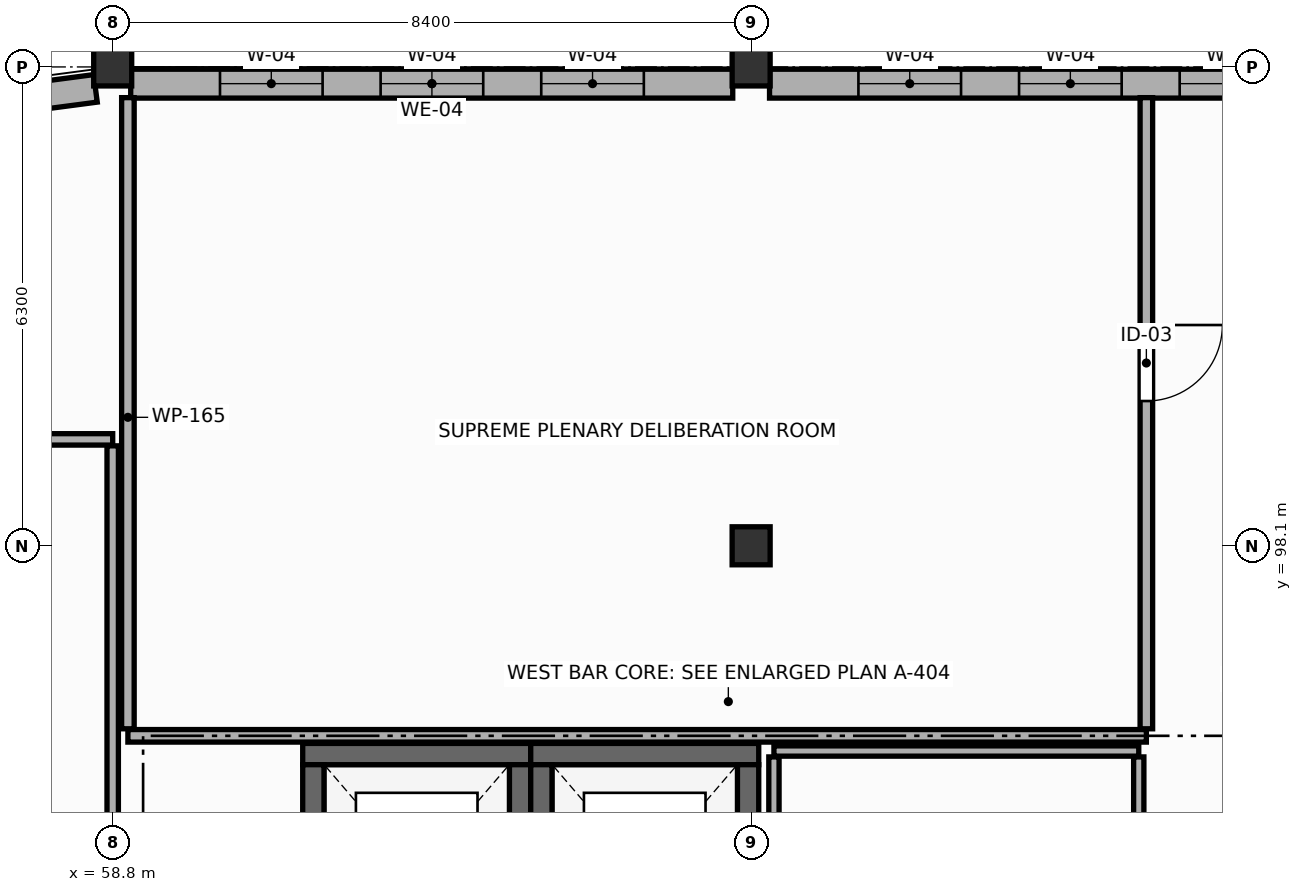
"""IFC4 building model, lengths in metres.
Left out: names, types, materials, properties, quantities, classifications, styles, units other than length and angle.
Written with IfcOpenShell. Run it as: python <this file> out.ifc"""

import sys

from ifc_helpers import new_model, si_unit, direction, frame, frame_2d, origin, origin_2d, place, context, subcontext, project, spatial, rectangle, extrude, element, fill, save


model = new_model("IFC4")
c1 = context("Model", 3, precision=1e-05, world=origin(), true_north=direction((0.0, 1.0)))
c2 = subcontext(c1, "Body", "Model", "MODEL_VIEW")
j1 = project(units=[si_unit("LENGTHUNIT", "METRE"), si_unit("PLANEANGLEUNIT", "RADIAN")], contexts=[c1])
p1 = place(None, origin())
s1 = spatial("IfcSite", under=j1, at=p1, CompositionType="ELEMENT")
p2 = place(p1, origin())
s2 = spatial("IfcBuilding", under=s1, at=p2, CompositionType="ELEMENT")
p3 = place(p2, frame((0.0, 0.0, 35.4)))
s3 = spatial("IfcBuildingStorey", under=s2, at=p3, CompositionType="ELEMENT", Elevation=35.4)
for number, where, z_axis, x_axis in (
    (1, (58.8, 104.4, 0.0), (0.0, 0.0, 1.0), (1.0, 0.0, 0.0)),
    (2, (67.2, 104.4, 0.0), (0.0, 0.0, 1.0), (1.0, 0.0, 0.0)),
    (3, (67.2, 98.1, 0.0), (0.0, 0.0, 1.0), (1.0, 0.0, 0.0)),
):
    element("IfcColumn", number, at=place(p3, frame(where, z_axis=z_axis, x_axis=x_axis)), inside=s3, PredefinedType="COLUMN", context=c2, shape_type="SweptSolid", body=[
        extrude(rectangle(XDim=0.5, YDim=0.5, at=origin_2d()), origin(), (0.0, 0.0, 1.0), 4.2),
    ])
p4 = place(p3, frame((59.037, 104.18, 0.0), z_axis=(0.0, 0.0, 1.0), x_axis=(1.0, 0.0, 0.0)))
e4 = element("IfcWall", 4, at=p4, inside=s3, PredefinedType="STANDARD", context=c2, shape_type="SweptSolid", body=[
    extrude(rectangle(XDim=7.921, YDim=0.38, at=frame_2d((3.96, 0.0))), origin(), (0.0, 0.0, 1.0), 3.095),
])
p5 = place(p4, frame((1.175, 0.0, 0.85)))
e5 = element("IfcOpeningElement", 5, at=p5, cuts=e4, PredefinedType="OPENING", context=c2, shape_type="SweptSolid", body=[
    extrude(rectangle(XDim=1.35, YDim=1.95, at=frame_2d((0.675, 0.975))), frame((0.0, 0.2, 0.0), z_axis=(0.0, -1.0, 0.0), x_axis=(1.0, 0.0, 0.0)), (0.0, 0.0, 1.0), 0.4),
])
p6 = place(p4, frame((3.288, 0.0, 0.85)))
e6 = element("IfcOpeningElement", 6, at=p6, cuts=e4, PredefinedType="OPENING", context=c2, shape_type="SweptSolid", body=[
    extrude(rectangle(XDim=1.35, YDim=1.95, at=frame_2d((0.675, 0.975))), frame((0.0, 0.2, 0.0), z_axis=(0.0, -1.0, 0.0), x_axis=(1.0, 0.0, 0.0)), (0.0, 0.0, 1.0), 0.4),
])
p7 = place(p4, frame((5.401, 0.0, 0.85)))
e7 = element("IfcOpeningElement", 7, at=p7, cuts=e4, PredefinedType="OPENING", context=c2, shape_type="SweptSolid", body=[
    extrude(rectangle(XDim=1.35, YDim=1.95, at=frame_2d((0.675, 0.975))), frame((0.0, 0.2, 0.0), z_axis=(0.0, -1.0, 0.0), x_axis=(1.0, 0.0, 0.0)), (0.0, 0.0, 1.0), 0.4),
])
p8 = place(p3, frame((67.442, 104.18, 0.0), z_axis=(0.0, 0.0, 1.0), x_axis=(1.0, 0.0, 0.0)))
e8 = element("IfcWall", 8, at=p8, inside=s3, PredefinedType="STANDARD", context=c2, shape_type="SweptSolid", body=[
    extrude(rectangle(XDim=7.916, YDim=0.38, at=frame_2d((3.958, 0.0))), origin(), (0.0, 0.0, 1.0), 3.095),
])
p9 = place(p8, frame((1.17, 0.0, 0.85)))
e9 = element("IfcOpeningElement", 9, at=p9, cuts=e8, PredefinedType="OPENING", context=c2, shape_type="SweptSolid", body=[
    extrude(rectangle(XDim=1.35, YDim=1.95, at=frame_2d((0.675, 0.975))), frame((0.0, 0.2, 0.0), z_axis=(0.0, -1.0, 0.0), x_axis=(1.0, 0.0, 0.0)), (0.0, 0.0, 1.0), 0.4),
])
p10 = place(p8, frame((3.283, 0.0, 0.85)))
e10 = element("IfcOpeningElement", 10, at=p10, cuts=e8, PredefinedType="OPENING", context=c2, shape_type="SweptSolid", body=[
    extrude(rectangle(XDim=1.35, YDim=1.95, at=frame_2d((0.675, 0.975))), frame((0.0, 0.2, 0.0), z_axis=(0.0, -1.0, 0.0), x_axis=(1.0, 0.0, 0.0)), (0.0, 0.0, 1.0), 0.4),
])
p11 = place(p8, frame((5.396, 0.0, 0.85)))
e11 = element("IfcOpeningElement", 11, at=p11, cuts=e8, PredefinedType="OPENING", context=c2, shape_type="SweptSolid", body=[
    extrude(rectangle(XDim=1.35, YDim=1.95, at=frame_2d((0.675, 0.975))), frame((0.0, 0.2, 0.0), z_axis=(0.0, -1.0, 0.0), x_axis=(1.0, 0.0, 0.0)), (0.0, 0.0, 1.0), 0.4),
])
p12 = place(p3, frame((58.573, 104.118, 0.0), z_axis=(0.0, 0.0, 1.0), x_axis=(-0.991449079029, -0.130494151946, 0.0)))
e12 = element("IfcWall", 12, at=p12, inside=s3, PredefinedType="ELEMENTEDWALL", context=c2, shape_type="SweptSolid", body=[
    extrude(rectangle(XDim=3.027, YDim=0.365, at=frame_2d((1.514, 0.0))), origin(), (0.0, 0.0, 1.0), 3.095),
])
p13 = place(p12, frame((1.128, 0.0, 0.85)))
e13 = element("IfcOpeningElement", 13, at=p13, cuts=e12, PredefinedType="OPENING", context=c2, shape_type="SweptSolid", body=[
    extrude(rectangle(XDim=0.8, YDim=1.7, at=frame_2d((0.4, 0.85))), frame((0.0, 0.192, 0.0), z_axis=(0.0, -1.0, 0.0), x_axis=(1.0, 0.0, 0.0)), (0.0, 0.0, 1.0), 0.385),
])
p14 = place(p3, frame((58.8, 104.25, 4.2), z_axis=(0.0, 0.0, 1.0), x_axis=(1.0, 0.0, 0.0)))
e14 = element("IfcWall", 14, at=p14, inside=s3, PredefinedType="PARAPET", context=c2, shape_type="SweptSolid", body=[
    extrude(rectangle(XDim=43.2, YDim=0.245, at=frame_2d((21.6, 0.0))), origin(), (0.0, 0.0, 1.0), 1.15),
])
p15 = place(p3, frame((58.8, 79.7, 4.2), z_axis=(0.0, 0.0, 1.0), x_axis=(0.0, 1.0, 0.0)))
e15 = element("IfcWall", 15, at=p15, inside=s3, PredefinedType="PARAPET", context=c2, shape_type="SweptSolid", body=[
    extrude(rectangle(XDim=24.2, YDim=0.245, at=frame_2d((12.1, 0.0))), origin(), (0.0, 0.0, 1.0), 1.15),
])
p16 = place(p3, frame((61.3, 95.36, 0.0), z_axis=(0.0, 0.0, 1.0), x_axis=(1.0, 0.0, 0.0)))
e16 = element("IfcWall", 16, at=p16, inside=s3, PredefinedType="SHEAR", context=c2, shape_type="SweptSolid", body=[
    extrude(rectangle(XDim=3.0, YDim=0.28, at=frame_2d((1.5, 0.0))), origin(), (0.0, 0.0, 1.0), 3.98),
])
for number, where, z_axis, x_axis in (
    (17, (61.44, 92.38, 0.0), (0.0, 0.0, 1.0), (0.0, 1.0, 0.0)),
    (18, (64.16, 95.22, 0.0), (0.0, 0.0, 1.0), (0.0, -1.0, 0.0)),
):
    element("IfcWall", number, at=place(p3, frame(where, z_axis=z_axis, x_axis=x_axis)), inside=s3, PredefinedType="SHEAR", context=c2, shape_type="SweptSolid", body=[
        extrude(rectangle(XDim=2.84, YDim=0.28, at=frame_2d((1.42, 0.0))), origin(), (0.0, 0.0, 1.0), 3.98),
    ])
p17 = place(p3, frame((64.3, 95.36, 0.0), z_axis=(0.0, 0.0, 1.0), x_axis=(1.0, 0.0, 0.0)))
e19 = element("IfcWall", 19, at=p17, inside=s3, PredefinedType="SHEAR", context=c2, shape_type="SweptSolid", body=[
    extrude(rectangle(XDim=3.0, YDim=0.28, at=frame_2d((1.5, 0.0))), origin(), (0.0, 0.0, 1.0), 3.98),
])
for number, where, z_axis, x_axis in (
    (20, (64.44, 92.38, 0.0), (0.0, 0.0, 1.0), (0.0, 1.0, 0.0)),
    (21, (67.16, 95.22, 0.0), (0.0, 0.0, 1.0), (0.0, -1.0, 0.0)),
):
    element("IfcWall", number, at=place(p3, frame(where, z_axis=z_axis, x_axis=x_axis)), inside=s3, PredefinedType="SHEAR", context=c2, shape_type="SweptSolid", body=[
        extrude(rectangle(XDim=2.84, YDim=0.28, at=frame_2d((1.42, 0.0))), origin(), (0.0, 0.0, 1.0), 3.98),
    ])
p18 = place(p3, frame((72.4, 95.6, 0.0), z_axis=(0.0, 0.0, 1.0), x_axis=(-1.0, 0.0, 0.0)))
e22 = element("IfcWall", 22, at=p18, inside=s3, PredefinedType="PARTITIONING", context=c2, shape_type="SweptSolid", body=[
    extrude(rectangle(XDim=13.4, YDim=0.165, at=frame_2d((6.7, 0.0))), origin(), (0.0, 0.0, 1.0), 3.095),
])
p19 = place(p3, frame((59.0, 95.692, 0.0), z_axis=(0.0, 0.0, 1.0), x_axis=(0.0, 1.0, 0.0)))
e23 = element("IfcWall", 23, at=p19, inside=s3, PredefinedType="PARTITIONING", context=c2, shape_type="SweptSolid", body=[
    extrude(rectangle(XDim=8.304, YDim=0.165, at=frame_2d((4.152, 0.0))), origin(), (0.0, 0.0, 1.0), 3.095),
])
p20 = place(p3, frame((72.4, 103.996, 0.0), z_axis=(0.0, 0.0, 1.0), x_axis=(0.0, -1.0, 0.0)))
e24 = element("IfcWall", 24, at=p20, inside=s3, PredefinedType="PARTITIONING", context=c2, shape_type="SweptSolid", body=[
    extrude(rectangle(XDim=8.304, YDim=0.165, at=frame_2d((4.152, 0.0))), origin(), (0.0, 0.0, 1.0), 3.95),
])
p21 = place(p20, frame((2.991, 0.0, 0.0)))
e25 = element("IfcOpeningElement", 25, at=p21, cuts=e24, PredefinedType="OPENING", context=c2, shape_type="SweptSolid", body=[
    extrude(rectangle(XDim=1.0, YDim=2.15, at=frame_2d((0.5, 1.075))), frame((0.0, 0.093, 0.0), z_axis=(0.0, -1.0, 0.0), x_axis=(1.0, 0.0, 0.0)), (0.0, 0.0, 1.0), 0.185),
])
p22 = place(p3, frame((67.5, 95.4, 0.0), z_axis=(0.0, 0.0, 1.0), x_axis=(1.0, 0.0, 0.0)))
e26 = element("IfcWall", 26, at=p22, inside=s3, PredefinedType="PARTITIONING", context=c2, shape_type="SweptSolid", body=[
    extrude(rectangle(XDim=4.8, YDim=0.135, at=frame_2d((2.4, 0.0))), origin(), (0.0, 0.0, 1.0), 3.495),
])
for number, where, z_axis, x_axis in (
    (27, (67.5, 92.028, 0.0), (0.0, 0.0, 1.0), (0.0, 1.0, 0.0)),
    (28, (72.3, 95.323, 0.0), (0.0, 0.0, 1.0), (0.0, -1.0, 0.0)),
):
    element("IfcWall", number, at=place(p3, frame(where, z_axis=z_axis, x_axis=x_axis)), inside=s3, PredefinedType="PARTITIONING", context=c2, shape_type="SweptSolid", body=[
        extrude(rectangle(XDim=3.295, YDim=0.135, at=frame_2d((1.647, 0.0))), origin(), (0.0, 0.0, 1.0), 3.395),
    ])
p23 = place(p3, frame((49.3, 99.5, 0.0), z_axis=(0.0, 0.0, 1.0), x_axis=(1.0, 0.0, 0.0)))
e29 = element("IfcWall", 29, at=p23, inside=s3, PredefinedType="PARTITIONING", context=c2, shape_type="SweptSolid", body=[
    extrude(rectangle(XDim=9.5, YDim=0.15, at=frame_2d((4.75, 0.0))), origin(), (0.0, 0.0, 1.0), 2.995),
])
p24 = place(p3, frame((58.8, 99.415, 0.0), z_axis=(0.0, 0.0, 1.0), x_axis=(0.0, -1.0, 0.0)))
e30 = element("IfcWall", 30, at=p24, inside=s3, PredefinedType="PARTITIONING", context=c2, shape_type="SweptSolid", body=[
    extrude(rectangle(XDim=7.38, YDim=0.15, at=frame_2d((3.69, 0.0))), origin(), (0.0, 0.0, 1.0), 3.095),
])
p25 = place(p5, origin())
e31 = element("IfcWindow", 31, at=p25, inside=s3, PartitioningType="SINGLE_PANEL", PredefinedType="WINDOW", context=c2, shape_type="SweptSolid", body=[
    extrude(rectangle(XDim=1.35, YDim=1.95, at=frame_2d((0.675, 0.975))), frame((0.0, 0.03, 0.0), z_axis=(0.0, -1.0, 0.0), x_axis=(1.0, 0.0, 0.0)), (0.0, 0.0, 1.0), 0.06),
])
fill(e5, e31)
p26 = place(p6, origin())
e32 = element("IfcWindow", 32, at=p26, inside=s3, PartitioningType="SINGLE_PANEL", PredefinedType="WINDOW", context=c2, shape_type="SweptSolid", body=[
    extrude(rectangle(XDim=1.35, YDim=1.95, at=frame_2d((0.675, 0.975))), frame((0.0, 0.03, 0.0), z_axis=(0.0, -1.0, 0.0), x_axis=(1.0, 0.0, 0.0)), (0.0, 0.0, 1.0), 0.06),
])
fill(e6, e32)
p27 = place(p7, origin())
e33 = element("IfcWindow", 33, at=p27, inside=s3, PartitioningType="SINGLE_PANEL", PredefinedType="WINDOW", context=c2, shape_type="SweptSolid", body=[
    extrude(rectangle(XDim=1.35, YDim=1.95, at=frame_2d((0.675, 0.975))), frame((0.0, 0.03, 0.0), z_axis=(0.0, -1.0, 0.0), x_axis=(1.0, 0.0, 0.0)), (0.0, 0.0, 1.0), 0.06),
])
fill(e7, e33)
p28 = place(p9, origin())
e34 = element("IfcWindow", 34, at=p28, inside=s3, PartitioningType="SINGLE_PANEL", PredefinedType="WINDOW", context=c2, shape_type="SweptSolid", body=[
    extrude(rectangle(XDim=1.35, YDim=1.95, at=frame_2d((0.675, 0.975))), frame((0.0, 0.03, 0.0), z_axis=(0.0, -1.0, 0.0), x_axis=(1.0, 0.0, 0.0)), (0.0, 0.0, 1.0), 0.06),
])
fill(e9, e34)
p29 = place(p10, origin())
e35 = element("IfcWindow", 35, at=p29, inside=s3, PartitioningType="SINGLE_PANEL", PredefinedType="WINDOW", context=c2, shape_type="SweptSolid", body=[
    extrude(rectangle(XDim=1.35, YDim=1.95, at=frame_2d((0.675, 0.975))), frame((0.0, 0.03, 0.0), z_axis=(0.0, -1.0, 0.0), x_axis=(1.0, 0.0, 0.0)), (0.0, 0.0, 1.0), 0.06),
])
fill(e10, e35)
p30 = place(p11, origin())
e36 = element("IfcWindow", 36, at=p30, inside=s3, PartitioningType="SINGLE_PANEL", PredefinedType="WINDOW", context=c2, shape_type="SweptSolid", body=[
    extrude(rectangle(XDim=1.35, YDim=1.95, at=frame_2d((0.675, 0.975))), frame((0.0, 0.03, 0.0), z_axis=(0.0, -1.0, 0.0), x_axis=(1.0, 0.0, 0.0)), (0.0, 0.0, 1.0), 0.06),
])
fill(e11, e36)
p31 = place(p21, origin())
e37 = element("IfcDoor", 37, at=p31, inside=s3, OperationType="SINGLE_SWING_LEFT", PredefinedType="DOOR", context=c2, shape_type="SweptSolid", body=[
    extrude(rectangle(XDim=1.0, YDim=2.15, at=frame_2d((0.5, 1.075))), frame((0.0, 0.025, 0.0), z_axis=(0.0, -1.0, 0.0), x_axis=(1.0, 0.0, 0.0)), (0.0, 0.0, 1.0), 0.05),
])
fill(e25, e37)
save(model, sys.argv[1])
